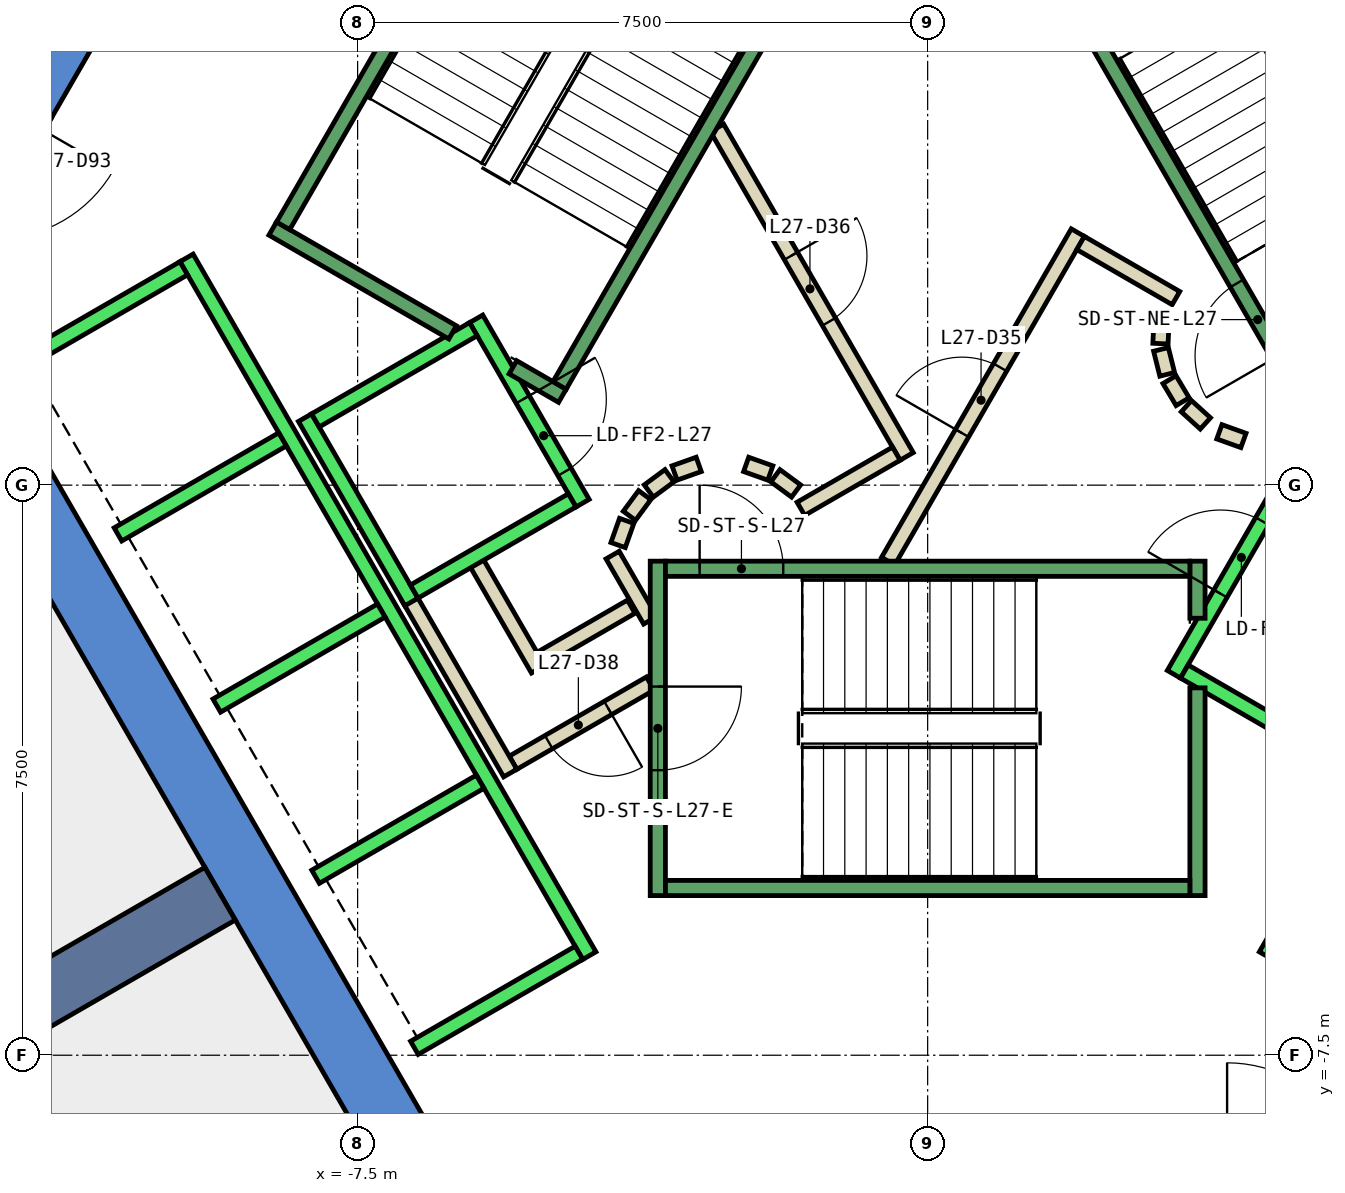
"""IFC4 building model, lengths in metres.
Left out: names, types, materials, properties, quantities, classifications, styles, units other than length and angle.
Written with IfcOpenShell. Run it as: python <this file> out.ifc"""

import sys

from ifc_helpers import new_model, si_unit, direction, frame, frame_2d, origin, place, context, subcontext, project, spatial, polyline, rectangle, outline, extrude, element, fill, save


model = new_model("IFC4")
c1 = context("Model", 3, precision=1e-05, world=origin(), true_north=direction((0.0, 1.0)))
c2 = subcontext(c1, "Body", "Model", "MODEL_VIEW")
j1 = project(units=[si_unit("LENGTHUNIT", "METRE"), si_unit("PLANEANGLEUNIT", "RADIAN")], contexts=[c1])
p1 = place(None, origin())
s1 = spatial("IfcSite", under=j1, at=p1, CompositionType="ELEMENT")
p2 = place(p1, origin())
s2 = spatial("IfcBuilding", under=s1, at=p2, CompositionType="ELEMENT")
p3 = place(p2, frame((0.0, 0.0, 124.4)))
s3 = spatial("IfcBuildingStorey", under=s2, at=p3, CompositionType="ELEMENT", Elevation=124.4)
p4 = place(p3, frame((0.0, 0.0, -0.4)))
e1 = element("IfcWall", 1, at=p4, inside=s3, PredefinedType="SHEAR", context=c2, shape_type="SweptSolid", body=[
    extrude(outline(polyline([(-12.267, 5.252), (-11.531, 4.827), (-6.437, 13.65), (-6.928, 14.5), (-12.267, 5.252)])), origin(), (0.0, 0.0, 1.0), 4.2),
])
p5 = place(p3, frame((0.0, 0.0, -0.4)))
e2 = element("IfcWall", 2, at=p5, inside=s3, PredefinedType="SHEAR", context=c2, shape_type="SweptSolid", body=[
    extrude(outline(polyline([(-13.856, 2.5), (-6.928, -9.5), (-6.437, -8.65), (-12.875, 2.5), (-13.856, 2.5)])), origin(), (0.0, 0.0, 1.0), 4.2),
])
p6 = place(p3, frame((-9.31, -5.375, -0.4), z_axis=(0.0, 0.0, 1.0), x_axis=(-0.866017533419, -0.500013631625, 0.0)))
e3 = element("IfcWall", 3, at=p6, inside=s3, PredefinedType="SHEAR", context=c2, shape_type="SweptSolid", body=[
    extrude(rectangle(XDim=9.0, YDim=0.8, at=frame_2d((4.5, 0.0))), origin(), (0.0, 0.0, 1.0), 4.2),
])
p7 = place(p3, frame((-3.9, -1.599, 0.0), z_axis=(0.0, 0.0, 1.0), x_axis=(-0.865969445389, -0.500096910261, 0.0)))
e4 = element("IfcWall", 4, at=p7, inside=s3, PredefinedType="PARTITIONING", context=c2, shape_type="SweptSolid", body=[
    extrude(rectangle(XDim=1.373, YDim=0.2, at=frame_2d((0.687, 0.0))), origin(), (0.0, 0.0, 1.0), 3.8),
])
p8 = place(p3, frame((-5.126, -2.422, 0.0), z_axis=(0.0, 0.0, 1.0), x_axis=(-0.500062241894, 0.865989465428, 0.0)))
e5 = element("IfcWall", 5, at=p8, inside=s3, PredefinedType="PARTITIONING", context=c2, shape_type="SweptSolid", body=[
    extrude(rectangle(XDim=1.7, YDim=0.2, at=frame_2d((0.85, 0.0))), origin(), (0.0, 0.0, 1.0), 3.8),
])
p9 = place(p3, frame((-3.65, -2.61, 0.0), z_axis=(0.0, 0.0, 1.0), x_axis=(-0.866072462134, -0.499918483688, 0.0)))
e6 = element("IfcWall", 6, at=p9, inside=s3, PredefinedType="PARTITIONING", context=c2, shape_type="SweptSolid", body=[
    extrude(rectangle(XDim=2.084, YDim=0.2, at=frame_2d((1.042, 0.0))), origin(), (0.0, 0.0, 1.0), 3.8),
])
p10 = place(p9, frame((0.642, 0.0, 0.0)))
e7 = element("IfcOpeningElement", 7, at=p10, cuts=e6, PredefinedType="OPENING", context=c2, shape_type="SweptSolid", body=[
    extrude(rectangle(XDim=0.9, YDim=2.1, at=frame_2d((0.45, 1.05))), frame((0.0, 0.11, 0.0), z_axis=(0.0, -1.0, 0.0), x_axis=(1.0, 0.0, 0.0)), (0.0, 0.0, 1.0), 0.22),
])
p11 = place(p3, frame((-5.492, -3.788, 0.0), z_axis=(0.0, 0.0, 1.0), x_axis=(-0.500008949224, 0.866020236886, 0.0)))
e8 = element("IfcWall", 8, at=p11, inside=s3, PredefinedType="PARTITIONING", context=c2, shape_type="SweptSolid", body=[
    extrude(rectangle(XDim=2.68, YDim=0.2, at=frame_2d((1.34, 0.0))), origin(), (0.0, 0.0, 1.0), 3.8),
])
p12 = place(p3, frame((-4.145, -0.92, 0.0), z_axis=(0.0, 0.0, 1.0), x_axis=(0.499743786207, -0.866173278362, 0.0)))
e9 = element("IfcWall", 9, at=p12, inside=s3, PredefinedType="PARTITIONING", context=c2, shape_type="SweptSolid", body=[
    extrude(rectangle(XDim=0.991, YDim=0.2, at=frame_2d((0.495, 0.0))), origin(), (0.0, 0.0, 1.0), 3.8),
])
p13 = place(p3, frame((-0.52, -1.0, 0.0), z_axis=(0.0, 0.0, 1.0), x_axis=(0.50011622646, 0.865958290007, 0.0)))
e10 = element("IfcWall", 10, at=p13, inside=s3, PredefinedType="PARTITIONING", context=c2, shape_type="SweptSolid", body=[
    extrude(rectangle(XDim=4.991, YDim=0.2, at=frame_2d((2.496, 0.0))), origin(), (0.0, 0.0, 1.0), 3.8),
])
p14 = place(p13, frame((1.945, 0.0, 0.0)))
e11 = element("IfcOpeningElement", 11, at=p14, cuts=e10, PredefinedType="OPENING", context=c2, shape_type="SweptSolid", body=[
    extrude(rectangle(XDim=1.0, YDim=2.1, at=frame_2d((0.5, 1.05))), frame((0.0, 0.11, 0.0), z_axis=(0.0, -1.0, 0.0), x_axis=(1.0, 0.0, 0.0)), (0.0, 0.0, 1.0), 0.22),
])
p15 = place(p3, frame((2.012, 3.186, 0.0), z_axis=(0.0, 0.0, 1.0), x_axis=(0.865891012941, -0.500232699559, 0.0)))
e12 = element("IfcWall", 12, at=p15, inside=s3, PredefinedType="PARTITIONING", context=c2, shape_type="SweptSolid", body=[
    extrude(rectangle(XDim=1.449, YDim=0.2, at=frame_2d((0.725, 0.0))), origin(), (0.0, 0.0, 1.0), 3.8),
])
p16 = place(p3, frame((3.079, 2.199, 0.0), z_axis=(0.0, 0.0, 1.0), x_axis=(-0.047771483479, -0.998858290933, 0.0)))
e13 = element("IfcWall", 13, at=p16, inside=s3, PredefinedType="PARTITIONING", context=c2, shape_type="SweptSolid", body=[
    extrude(rectangle(XDim=0.337, YDim=0.2, at=frame_2d((0.169, 0.0))), origin(), (0.0, 0.0, 1.0), 3.8),
])
p17 = place(p3, frame((3.07, 1.786, 0.0), z_axis=(0.0, 0.0, 1.0), x_axis=(0.242705583207, -0.970099994784, 0.0)))
e14 = element("IfcWall", 14, at=p17, inside=s3, PredefinedType="PARTITIONING", context=c2, shape_type="SweptSolid", body=[
    extrude(rectangle(XDim=0.338, YDim=0.2, at=frame_2d((0.169, 0.0))), origin(), (0.0, 0.0, 1.0), 3.8),
])
for number, where, z_axis, x_axis in (
    (15, (3.182, 1.388, 0.0), (0.0, 0.0, 1.0), (0.512, -0.859, 0.0)),
    (16, (3.404, 1.039, 0.0), (0.0, 0.0, 1.0), (0.74, -0.672, 0.0)),
):
    element("IfcWall", number, at=place(p3, frame(where, z_axis=z_axis, x_axis=x_axis)), inside=s3, PredefinedType="PARTITIONING", context=c2, shape_type="SweptSolid", body=[
        extrude(rectangle(XDim=0.338, YDim=0.2, at=frame_2d((0.169, 0.0))), origin(), (0.0, 0.0, 1.0), 3.8),
    ])
p18 = place(p3, frame((3.838, 0.702, 0.0), z_axis=(0.0, 0.0, 1.0), x_axis=(0.941035081519, -0.338308993895, 0.0)))
e17 = element("IfcWall", 17, at=p18, inside=s3, PredefinedType="PARTITIONING", context=c2, shape_type="SweptSolid", body=[
    extrude(rectangle(XDim=0.337, YDim=0.2, at=frame_2d((0.168, 0.0))), origin(), (0.0, 0.0, 1.0), 3.8),
])
p19 = place(p3, frame((-2.771, 4.7, 0.0), z_axis=(0.0, 0.0, 1.0), x_axis=(0.499969479948, -0.866043023828, 0.0)))
e18 = element("IfcWall", 18, at=p19, inside=s3, PredefinedType="PARTITIONING", context=c2, shape_type="SweptSolid", body=[
    extrude(rectangle(XDim=4.99, YDim=0.2, at=frame_2d((2.495, 0.0))), origin(), (0.0, 0.0, 1.0), 3.8),
])
p20 = place(p19, frame((1.945, 0.0, 0.0)))
e19 = element("IfcOpeningElement", 19, at=p20, cuts=e18, PredefinedType="OPENING", context=c2, shape_type="SweptSolid", body=[
    extrude(rectangle(XDim=1.0, YDim=2.1, at=frame_2d((0.5, 1.05))), frame((0.0, 0.11, 0.0), z_axis=(0.0, -1.0, 0.0), x_axis=(1.0, 0.0, 0.0)), (0.0, 0.0, 1.0), 0.22),
])
p21 = place(p3, frame((-0.412, 0.414, 0.0), z_axis=(0.0, 0.0, 1.0), x_axis=(-0.866017369001, -0.500013916395, 0.0)))
e20 = element("IfcWall", 20, at=p21, inside=s3, PredefinedType="PARTITIONING", context=c2, shape_type="SweptSolid", body=[
    extrude(rectangle(XDim=1.45, YDim=0.2, at=frame_2d((0.725, 0.0))), origin(), (0.0, 0.0, 1.0), 3.8),
])
p22 = place(p3, frame((-1.731, -0.077, 0.0), z_axis=(0.0, 0.0, 1.0), x_axis=(-0.804311165252, 0.594208338422, 0.0)))
e21 = element("IfcWall", 21, at=p22, inside=s3, PredefinedType="PARTITIONING", context=c2, shape_type="SweptSolid", body=[
    extrude(rectangle(XDim=0.338, YDim=0.2, at=frame_2d((0.169, 0.0))), origin(), (0.0, 0.0, 1.0), 3.8),
])
p23 = place(p3, frame((-2.07, 0.16, 0.0), z_axis=(0.0, 0.0, 1.0), x_axis=(-0.942199461132, 0.335052496547, 0.0)))
e22 = element("IfcWall", 22, at=p23, inside=s3, PredefinedType="PARTITIONING", context=c2, shape_type="SweptSolid", body=[
    extrude(rectangle(XDim=0.337, YDim=0.2, at=frame_2d((0.169, 0.0))), origin(), (0.0, 0.0, 1.0), 3.8),
])
p24 = place(p3, frame((-3.012, 0.273, 0.0), z_axis=(0.0, 0.0, 1.0), x_axis=(-0.942280615813, -0.334824194261, 0.0)))
e23 = element("IfcWall", 23, at=p24, inside=s3, PredefinedType="PARTITIONING", context=c2, shape_type="SweptSolid", body=[
    extrude(rectangle(XDim=0.338, YDim=0.2, at=frame_2d((0.169, 0.0))), origin(), (0.0, 0.0, 1.0), 3.8),
])
p25 = place(p3, frame((-3.397, 0.124, 0.0), z_axis=(0.0, 0.0, 1.0), x_axis=(-0.804311165252, -0.594208338422, 0.0)))
e24 = element("IfcWall", 24, at=p25, inside=s3, PredefinedType="PARTITIONING", context=c2, shape_type="SweptSolid", body=[
    extrude(rectangle(XDim=0.338, YDim=0.2, at=frame_2d((0.169, 0.0))), origin(), (0.0, 0.0, 1.0), 3.8),
])
p26 = place(p3, frame((-3.723, -0.131, 0.0), z_axis=(0.0, 0.0, 1.0), x_axis=(-0.594675113454, -0.803966112121, 0.0)))
e25 = element("IfcWall", 25, at=p26, inside=s3, PredefinedType="PARTITIONING", context=c2, shape_type="SweptSolid", body=[
    extrude(rectangle(XDim=0.338, YDim=0.2, at=frame_2d((0.169, 0.0))), origin(), (0.0, 0.0, 1.0), 3.8),
])
p27 = place(p3, frame((-3.96, -0.47, 0.0), z_axis=(0.0, 0.0, 1.0), x_axis=(-0.334824194261, -0.942280615813, 0.0)))
e26 = element("IfcWall", 26, at=p27, inside=s3, PredefinedType="PARTITIONING", context=c2, shape_type="SweptSolid", body=[
    extrude(rectangle(XDim=0.338, YDim=0.2, at=frame_2d((0.169, 0.0))), origin(), (0.0, 0.0, 1.0), 3.8),
])
p28 = place(p3, frame((-5.94, 2.188, 0.0), z_axis=(0.0, 0.0, 1.0), x_axis=(0.49994636267, -0.866056369097, 0.0)))
e27 = element("IfcWall", 27, at=p28, inside=s3, PredefinedType="STANDARD", context=c2, shape_type="SweptSolid", body=[
    extrude(rectangle(XDim=2.8, YDim=0.2, at=frame_2d((1.4, 0.0))), origin(), (0.0, 0.0, 1.0), 3.8),
])
p29 = place(p28, frame((1.225, 0.0, 0.0)))
e28 = element("IfcOpeningElement", 28, at=p29, cuts=e27, PredefinedType="OPENING", context=c2, shape_type="SweptSolid", body=[
    extrude(rectangle(XDim=1.1, YDim=2.1, at=frame_2d((0.55, 1.05))), frame((0.0, 0.11, 0.0), z_axis=(0.0, -1.0, 0.0), x_axis=(1.0, 0.0, 0.0)), (0.0, 0.0, 1.0), 0.22),
])
p30 = place(p3, frame((-8.192, 0.888, 0.0), z_axis=(0.0, 0.0, 1.0), x_axis=(0.49994636267, -0.866056369097, 0.0)))
e29 = element("IfcWall", 29, at=p30, inside=s3, PredefinedType="STANDARD", context=c2, shape_type="SweptSolid", body=[
    extrude(rectangle(XDim=2.8, YDim=0.2, at=frame_2d((1.4, 0.0))), origin(), (0.0, 0.0, 1.0), 3.8),
])
for number, where, z_axis, x_axis in (
    (30, (-5.977, 2.052, 0.0), (0.0, 0.0, 1.0), (-0.866, -0.5, 0.0)),
    (31, (-4.677, -0.2, 0.0), (0.0, 0.0, 1.0), (-0.866, -0.5, 0.0)),
):
    element("IfcWall", number, at=place(p3, frame(where, z_axis=z_axis, x_axis=x_axis)), inside=s3, PredefinedType="STANDARD", context=c2, shape_type="SweptSolid", body=[
        extrude(rectangle(XDim=2.399, YDim=0.2, at=frame_2d((1.2, 0.0))), origin(), (0.0, 0.0, 1.0), 3.8),
    ])
p31 = place(p3, frame((-9.751, 2.99, 0.0), z_axis=(0.0, 0.0, 1.0), x_axis=(0.50000090737, -0.866024879913, 0.0)))
e32 = element("IfcWall", 32, at=p31, inside=s3, PredefinedType="STANDARD", context=c2, shape_type="SweptSolid", body=[
    extrude(rectangle(XDim=10.6, YDim=0.2, at=frame_2d((5.3, 0.0))), origin(), (0.0, 0.0, 1.0), 3.8),
])
p32 = place(p3, frame((-9.788, 2.853, 0.0), z_axis=(0.0, 0.0, 1.0), x_axis=(-0.865998541277, -0.500046524342, 0.0)))
e33 = element("IfcWall", 33, at=p32, inside=s3, PredefinedType="STANDARD", context=c2, shape_type="SweptSolid", body=[
    extrude(rectangle(XDim=2.5, YDim=0.2, at=frame_2d((1.25, 0.0))), origin(), (0.0, 0.0, 1.0), 3.8),
])
for number, where, z_axis, x_axis in (
    (34, (-8.488, 0.602, 0.0), (0.0, 0.0, 1.0), (-0.866, -0.5, 0.0)),
    (35, (-7.188, -1.65, 0.0), (0.0, 0.0, 1.0), (-0.866, -0.5, 0.0)),
    (36, (-5.888, -3.902, 0.0), (0.0, 0.0, 1.0), (-0.866, -0.5, 0.0)),
    (37, (-4.588, -6.153, 0.0), (0.0, 0.0, 1.0), (-0.866, -0.5, 0.0)),
):
    element("IfcWall", number, at=place(p3, frame(where, z_axis=z_axis, x_axis=x_axis)), inside=s3, PredefinedType="STANDARD", context=c2, shape_type="SweptSolid", body=[
        extrude(rectangle(XDim=2.5, YDim=0.2, at=frame_2d((1.25, 0.0))), origin(), (0.0, 0.0, 1.0), 3.8),
    ])
p33 = place(p3, frame((3.24, -2.488, 0.0), z_axis=(0.0, 0.0, 1.0), x_axis=(0.49994636267, 0.866056369097, 0.0)))
e38 = element("IfcWall", 38, at=p33, inside=s3, PredefinedType="STANDARD", context=c2, shape_type="SweptSolid", body=[
    extrude(rectangle(XDim=2.8, YDim=0.2, at=frame_2d((1.4, 0.0))), origin(), (0.0, 0.0, 1.0), 3.8),
])
p34 = place(p33, frame((1.225, 0.0, 0.0)))
e39 = element("IfcOpeningElement", 39, at=p34, cuts=e38, PredefinedType="OPENING", context=c2, shape_type="SweptSolid", body=[
    extrude(rectangle(XDim=1.1, YDim=2.1, at=frame_2d((0.55, 1.05))), frame((0.0, 0.11, 0.0), z_axis=(0.0, -1.0, 0.0), x_axis=(1.0, 0.0, 0.0)), (0.0, 0.0, 1.0), 0.22),
])
p35 = place(p3, frame((3.377, -2.452, 0.0), z_axis=(0.0, 0.0, 1.0), x_axis=(0.865955154139, -0.50012165622, 0.0)))
e40 = element("IfcWall", 40, at=p35, inside=s3, PredefinedType="STANDARD", context=c2, shape_type="SweptSolid", body=[
    extrude(rectangle(XDim=2.4, YDim=0.2, at=frame_2d((1.2, 0.0))), origin(), (0.0, 0.0, 1.0), 3.8),
])
p36 = place(p3, frame((4.451, -6.19, 0.0), z_axis=(0.0, 0.0, 1.0), x_axis=(0.50000090737, 0.866024879913, 0.0)))
e41 = element("IfcWall", 41, at=p36, inside=s3, PredefinedType="STANDARD", context=c2, shape_type="SweptSolid", body=[
    extrude(rectangle(XDim=10.6, YDim=0.2, at=frame_2d((5.3, 0.0))), origin(), (0.0, 0.0, 1.0), 3.8),
])
p37 = place(p3, frame((-3.55, -1.0, 0.0), z_axis=(0.0, 0.0, 1.0), x_axis=(0.0, -1.0, 0.0)))
e42 = element("IfcWall", 42, at=p37, inside=s3, PredefinedType="STANDARD", context=c2, shape_type="SweptSolid", body=[
    extrude(rectangle(XDim=4.4, YDim=0.2, at=frame_2d((2.2, 0.0))), origin(), (0.0, 0.0, 1.0), 3.8),
])
p38 = place(p37, frame((1.65, 0.0, 0.0)))
e43 = element("IfcOpeningElement", 43, at=p38, cuts=e42, PredefinedType="OPENING", context=c2, shape_type="SweptSolid", body=[
    extrude(rectangle(XDim=1.1, YDim=2.2, at=frame_2d((0.55, 1.1))), frame((0.0, 0.11, 0.0), z_axis=(0.0, -1.0, 0.0), x_axis=(1.0, 0.0, 0.0)), (0.0, 0.0, 1.0), 0.22),
])
p39 = place(p3, frame((3.55, -2.667, 0.0), z_axis=(0.0, 0.0, 1.0), x_axis=(0.0, -1.0, 0.0)))
e44 = element("IfcWall", 44, at=p39, inside=s3, PredefinedType="STANDARD", context=c2, shape_type="SweptSolid", body=[
    extrude(rectangle(XDim=2.733, YDim=0.2, at=frame_2d((1.366, 0.0))), origin(), (0.0, 0.0, 1.0), 3.8),
])
p40 = place(p3, frame((3.55, -1.0, 0.0), z_axis=(0.0, 0.0, 1.0), x_axis=(0.0, -1.0, 0.0)))
e45 = element("IfcWall", 45, at=p40, inside=s3, PredefinedType="STANDARD", context=c2, shape_type="SweptSolid", body=[
    extrude(rectangle(XDim=0.751, YDim=0.2, at=frame_2d((0.375, 0.0))), origin(), (0.0, 0.0, 1.0), 3.8),
])
p41 = place(p3, frame((-3.45, -1.1, 0.0), z_axis=(0.0, 0.0, 1.0), x_axis=(1.0, 0.0, 0.0)))
e46 = element("IfcWall", 46, at=p41, inside=s3, PredefinedType="STANDARD", context=c2, shape_type="SweptSolid", body=[
    extrude(rectangle(XDim=6.9, YDim=0.2, at=frame_2d((3.45, 0.0))), origin(), (0.0, 0.0, 1.0), 3.8),
])
p42 = place(p41, frame((0.45, 0.0, 0.0)))
e47 = element("IfcOpeningElement", 47, at=p42, cuts=e46, PredefinedType="OPENING", context=c2, shape_type="SweptSolid", body=[
    extrude(rectangle(XDim=1.1, YDim=2.2, at=frame_2d((0.55, 1.1))), frame((0.0, 0.11, 0.0), z_axis=(0.0, -1.0, 0.0), x_axis=(1.0, 0.0, 0.0)), (0.0, 0.0, 1.0), 0.22),
])
p43 = place(p3, frame((-3.45, -5.3, 0.0), z_axis=(0.0, 0.0, 1.0), x_axis=(1.0, 0.0, 0.0)))
e48 = element("IfcWall", 48, at=p43, inside=s3, PredefinedType="STANDARD", context=c2, shape_type="SweptSolid", body=[
    extrude(rectangle(XDim=6.9, YDim=0.2, at=frame_2d((3.45, 0.0))), origin(), (0.0, 0.0, 1.0), 3.8),
])
p44 = place(p3, frame((4.843, 1.312, 0.0), z_axis=(0.0, 0.0, 1.0), x_axis=(-0.499963383562, 0.866046543262, 0.0)))
e49 = element("IfcWall", 49, at=p44, inside=s3, PredefinedType="STANDARD", context=c2, shape_type="SweptSolid", body=[
    extrude(rectangle(XDim=6.9, YDim=0.2, at=frame_2d((3.45, 0.0))), origin(), (0.0, 0.0, 1.0), 3.8),
])
p45 = place(p44, frame((0.45, 0.0, 0.0)))
e50 = element("IfcOpeningElement", 50, at=p45, cuts=e49, PredefinedType="OPENING", context=c2, shape_type="SweptSolid", body=[
    extrude(rectangle(XDim=1.1, YDim=2.2, at=frame_2d((0.55, 1.1))), frame((0.0, 0.11, 0.0), z_axis=(0.0, -1.0, 0.0), x_axis=(1.0, 0.0, 0.0)), (0.0, 0.0, 1.0), 0.22),
])
p46 = place(p3, frame((-6.25, 2.01, 0.0), z_axis=(0.0, 0.0, 1.0), x_axis=(-0.86611865017, 0.499838457731, 0.0)))
e51 = element("IfcWall", 51, at=p46, inside=s3, PredefinedType="STANDARD", context=c2, shape_type="SweptSolid", body=[
    extrude(rectangle(XDim=2.733, YDim=0.2, at=frame_2d((1.366, 0.0))), origin(), (0.0, 0.0, 1.0), 3.8),
])
p47 = place(p3, frame((-4.806, 1.176, 0.0), z_axis=(0.0, 0.0, 1.0), x_axis=(-0.866558586415, 0.499075361355, 0.0)))
e52 = element("IfcWall", 52, at=p47, inside=s3, PredefinedType="STANDARD", context=c2, shape_type="SweptSolid", body=[
    extrude(rectangle(XDim=0.751, YDim=0.2, at=frame_2d((0.376, 0.0))), origin(), (0.0, 0.0, 1.0), 3.8),
])
p48 = place(p3, frame((-1.393, 7.288, 0.0), z_axis=(0.0, 0.0, 1.0), x_axis=(-0.499963383562, -0.866046543262, 0.0)))
e53 = element("IfcWall", 53, at=p48, inside=s3, PredefinedType="STANDARD", context=c2, shape_type="SweptSolid", body=[
    extrude(rectangle(XDim=6.9, YDim=0.2, at=frame_2d((3.45, 0.0))), origin(), (0.0, 0.0, 1.0), 3.8),
])
p49 = place(p48, frame((0.45, 0.0, 0.0)))
e54 = element("IfcOpeningElement", 54, at=p49, cuts=e53, PredefinedType="OPENING", context=c2, shape_type="SweptSolid", body=[
    extrude(rectangle(XDim=1.1, YDim=2.2, at=frame_2d((0.55, 1.1))), frame((0.0, 0.11, 0.0), z_axis=(0.0, -1.0, 0.0), x_axis=(1.0, 0.0, 0.0)), (0.0, 0.0, 1.0), 0.22),
])
p50 = place(p3, frame((-5.03, 9.388, 0.0), z_axis=(0.0, 0.0, 1.0), x_axis=(-0.499978703459, -0.866037698999, 0.0)))
e55 = element("IfcWall", 55, at=p50, inside=s3, PredefinedType="STANDARD", context=c2, shape_type="SweptSolid", body=[
    extrude(rectangle(XDim=6.9, YDim=0.2, at=frame_2d((3.45, 0.0))), origin(), (0.0, 0.0, 1.0), 3.8),
])
p51 = place(p14, origin())
e56 = element("IfcDoor", 56, at=p51, inside=s3, OperationType="SINGLE_SWING_LEFT", PredefinedType="DOOR", context=c2, shape_type="SweptSolid", body=[
    extrude(rectangle(XDim=1.0, YDim=2.1, at=frame_2d((0.5, 1.05))), frame((0.0, 0.025, 0.0), z_axis=(0.0, -1.0, 0.0), x_axis=(1.0, 0.0, 0.0)), (0.0, 0.0, 1.0), 0.05),
])
fill(e11, e56)
p52 = place(p20, origin())
e57 = element("IfcDoor", 57, at=p52, inside=s3, OperationType="SINGLE_SWING_RIGHT", PredefinedType="DOOR", context=c2, shape_type="SweptSolid", body=[
    extrude(rectangle(XDim=1.0, YDim=2.1, at=frame_2d((0.5, 1.05))), frame((0.0, 0.025, 0.0), z_axis=(0.0, -1.0, 0.0), x_axis=(1.0, 0.0, 0.0)), (0.0, 0.0, 1.0), 0.05),
])
fill(e19, e57)
p53 = place(p10, origin())
e58 = element("IfcDoor", 58, at=p53, inside=s3, OperationType="SINGLE_SWING_LEFT", PredefinedType="DOOR", context=c2, shape_type="SweptSolid", body=[
    extrude(rectangle(XDim=0.9, YDim=2.1, at=frame_2d((0.45, 1.05))), frame((0.0, 0.025, 0.0), z_axis=(0.0, -1.0, 0.0), x_axis=(1.0, 0.0, 0.0)), (0.0, 0.0, 1.0), 0.05),
])
fill(e7, e58)
p54 = place(p34, origin())
e59 = element("IfcDoor", 59, at=p54, inside=s3, OperationType="SLIDING_TO_LEFT", PredefinedType="DOOR", context=c2, shape_type="SweptSolid", body=[
    extrude(rectangle(XDim=1.1, YDim=2.1, at=frame_2d((0.55, 1.05))), frame((0.0, 0.025, 0.0), z_axis=(0.0, -1.0, 0.0), x_axis=(1.0, 0.0, 0.0)), (0.0, 0.0, 1.0), 0.05),
])
fill(e39, e59)
p55 = place(p29, origin())
e60 = element("IfcDoor", 60, at=p55, inside=s3, OperationType="SLIDING_TO_LEFT", PredefinedType="DOOR", context=c2, shape_type="SweptSolid", body=[
    extrude(rectangle(XDim=1.1, YDim=2.1, at=frame_2d((0.55, 1.05))), frame((0.0, 0.025, 0.0), z_axis=(0.0, -1.0, 0.0), x_axis=(1.0, 0.0, 0.0)), (0.0, 0.0, 1.0), 0.05),
])
fill(e28, e60)
p56 = place(p42, origin())
e61 = element("IfcDoor", 61, at=p56, inside=s3, OperationType="SINGLE_SWING_LEFT", PredefinedType="DOOR", context=c2, shape_type="SweptSolid", body=[
    extrude(rectangle(XDim=1.1, YDim=2.2, at=frame_2d((0.55, 1.1))), frame((0.0, 0.025, 0.0), z_axis=(0.0, -1.0, 0.0), x_axis=(1.0, 0.0, 0.0)), (0.0, 0.0, 1.0), 0.05),
])
fill(e47, e61)
p57 = place(p38, origin())
e62 = element("IfcDoor", 62, at=p57, inside=s3, OperationType="SINGLE_SWING_LEFT", PredefinedType="DOOR", context=c2, shape_type="SweptSolid", body=[
    extrude(rectangle(XDim=1.1, YDim=2.2, at=frame_2d((0.55, 1.1))), frame((0.0, 0.025, 0.0), z_axis=(0.0, -1.0, 0.0), x_axis=(1.0, 0.0, 0.0)), (0.0, 0.0, 1.0), 0.05),
])
fill(e43, e62)
p58 = place(p45, origin())
e63 = element("IfcDoor", 63, at=p58, inside=s3, OperationType="SINGLE_SWING_LEFT", PredefinedType="DOOR", context=c2, shape_type="SweptSolid", body=[
    extrude(rectangle(XDim=1.1, YDim=2.2, at=frame_2d((0.55, 1.1))), frame((0.0, 0.025, 0.0), z_axis=(0.0, -1.0, 0.0), x_axis=(1.0, 0.0, 0.0)), (0.0, 0.0, 1.0), 0.05),
])
fill(e50, e63)
save(model, sys.argv[1])
